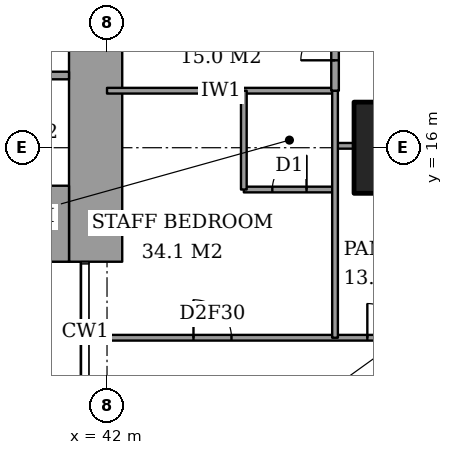
"""IFC4 building model, lengths in metres.
Left out: names, types, materials, properties, quantities, classifications, styles, units other than length and angle.
Written with IfcOpenShell. Run it as: python <this file> out.ifc"""

import sys

from ifc_helpers import new_model, si_unit, direction, frame, frame_2d, origin, origin_2d, place, context, subcontext, project, spatial, rectangle, extrude, element, fill, save


model = new_model("IFC4")
c1 = context("Model", 3, precision=1e-05, world=origin(), true_north=direction((0.0, 1.0)))
c2 = subcontext(c1, "Body", "Model", "MODEL_VIEW")
j1 = project(units=[si_unit("LENGTHUNIT", "METRE"), si_unit("PLANEANGLEUNIT", "RADIAN")], contexts=[c1])
p1 = place(None, origin())
s1 = spatial("IfcSite", under=j1, at=p1, CompositionType="ELEMENT")
p2 = place(p1, origin())
s2 = spatial("IfcBuilding", under=s1, at=p2, CompositionType="ELEMENT")
p3 = place(p2, frame((0.0, 0.0, 168.2)))
s3 = spatial("IfcBuildingStorey", under=s2, at=p3, CompositionType="ELEMENT", Elevation=168.2)
p4 = place(p3, frame((50.0, 16.0, 0.0), z_axis=(0.0, 0.0, 1.0), x_axis=(1.0, 0.0, 0.0)))
e1 = element("IfcColumn", 1, at=p4, inside=s3, PredefinedType="COLUMN", context=c2, shape_type="SweptSolid", body=[
    extrude(rectangle(XDim=3.0, YDim=2.4, at=origin_2d()), origin(), (0.0, 0.0, 1.0), 3.6),
])
p5 = place(p3, frame((37.85, 14.0, 0.0), z_axis=(0.0, 0.0, 1.0), x_axis=(1.0, 0.0, 0.0)))
e2 = element("IfcWall", 2, at=p5, inside=s3, PredefinedType="SHEAR", context=c2, shape_type="SweptSolid", body=[
    extrude(rectangle(XDim=3.15, YDim=2.0, at=frame_2d((1.575, 0.0))), origin(), (0.0, 0.0, 1.0), 3.6),
])
p6 = place(p3, frame((41.7, 13.0, 0.0), z_axis=(0.0, 0.0, 1.0), x_axis=(0.0, 1.0, 0.0)))
e3 = element("IfcWall", 3, at=p6, inside=s3, PredefinedType="SHEAR", context=c2, shape_type="SweptSolid", body=[
    extrude(rectangle(XDim=11.85, YDim=1.4, at=frame_2d((5.925, 0.0))), origin(), (0.0, 0.0, 1.0), 3.6),
])
p7 = place(p6, frame((7.5, 0.0, 0.0)))
e4 = element("IfcOpeningElement", 4, at=p7, cuts=e3, PredefinedType="OPENING", context=c2, shape_type="SweptSolid", body=[
    extrude(rectangle(XDim=1.8, YDim=2.4, at=frame_2d((0.9, 1.2))), frame((0.0, 0.71, 0.0), z_axis=(0.0, -1.0, 0.0), x_axis=(1.0, 0.0, 0.0)), (0.0, 0.0, 1.0), 1.42),
])
p8 = place(p3, frame((41.439, 11.0, 0.0), z_axis=(0.0, 0.0, 1.0), x_axis=(1.0, 0.0, 0.0)))
e5 = element("IfcWall", 5, at=p8, inside=s3, PredefinedType="PARTITIONING", context=c2, shape_type="SweptSolid", body=[
    extrude(rectangle(XDim=25.011, YDim=0.15, at=frame_2d((12.505, 0.0))), origin(), (0.0, 0.0, 1.0), 3.25),
])
p9 = place(p8, frame((12.361, 0.0, 0.0)))
e6 = element("IfcOpeningElement", 6, at=p9, cuts=e5, PredefinedType="OPENING", context=c2, shape_type="SweptSolid", body=[
    extrude(rectangle(XDim=1.0, YDim=2.1, at=frame_2d((0.5, 1.05))), frame((0.0, 0.085, 0.0), z_axis=(0.0, -1.0, 0.0), x_axis=(1.0, 0.0, 0.0)), (0.0, 0.0, 1.0), 0.17),
])
p10 = place(p8, frame((20.924, 0.0, 0.0)))
e7 = element("IfcOpeningElement", 7, at=p10, cuts=e5, PredefinedType="OPENING", context=c2, shape_type="SweptSolid", body=[
    extrude(rectangle(XDim=1.0, YDim=2.1, at=frame_2d((0.5, 1.05))), frame((0.0, 0.085, 0.0), z_axis=(0.0, -1.0, 0.0), x_axis=(1.0, 0.0, 0.0)), (0.0, 0.0, 1.0), 0.17),
])
p11 = place(p8, frame((15.448, 0.0, 0.0)))
e8 = element("IfcOpeningElement", 8, at=p11, cuts=e5, PredefinedType="OPENING", context=c2, shape_type="SweptSolid", body=[
    extrude(rectangle(XDim=0.9, YDim=2.1, at=frame_2d((0.45, 1.05))), frame((0.0, 0.085, 0.0), z_axis=(0.0, -1.0, 0.0), x_axis=(1.0, 0.0, 0.0)), (0.0, 0.0, 1.0), 0.17),
])
p12 = place(p8, frame((9.961, 0.0, 0.0)))
e9 = element("IfcOpeningElement", 9, at=p12, cuts=e5, PredefinedType="OPENING", context=c2, shape_type="SweptSolid", body=[
    extrude(rectangle(XDim=1.0, YDim=2.1, at=frame_2d((0.5, 1.05))), frame((0.0, 0.085, 0.0), z_axis=(0.0, -1.0, 0.0), x_axis=(1.0, 0.0, 0.0)), (0.0, 0.0, 1.0), 0.17),
])
p13 = place(p8, frame((7.411, 0.0, 0.0)))
e10 = element("IfcOpeningElement", 10, at=p13, cuts=e5, PredefinedType="OPENING", context=c2, shape_type="SweptSolid", body=[
    extrude(rectangle(XDim=0.9, YDim=2.1, at=frame_2d((0.45, 1.05))), frame((0.0, 0.085, 0.0), z_axis=(0.0, -1.0, 0.0), x_axis=(1.0, 0.0, 0.0)), (0.0, 0.0, 1.0), 0.17),
])
p14 = place(p8, frame((2.836, 0.0, 0.0)))
e11 = element("IfcOpeningElement", 11, at=p14, cuts=e5, PredefinedType="OPENING", context=c2, shape_type="SweptSolid", body=[
    extrude(rectangle(XDim=1.0, YDim=2.1, at=frame_2d((0.5, 1.05))), frame((0.0, 0.085, 0.0), z_axis=(0.0, -1.0, 0.0), x_axis=(1.0, 0.0, 0.0)), (0.0, 0.0, 1.0), 0.17),
])
p15 = place(p3, frame((45.6, 14.9, 0.0), z_axis=(0.0, 0.0, 1.0), x_axis=(1.0, 0.0, 0.0)))
e12 = element("IfcWall", 12, at=p15, inside=s3, PredefinedType="PARTITIONING", context=c2, shape_type="SweptSolid", body=[
    extrude(rectangle(XDim=2.4, YDim=0.15, at=frame_2d((1.2, 0.0))), origin(), (0.0, 0.0, 1.0), 3.25),
])
p16 = place(p15, frame((0.75, 0.0, 0.0)))
e13 = element("IfcOpeningElement", 13, at=p16, cuts=e12, PredefinedType="OPENING", context=c2, shape_type="SweptSolid", body=[
    extrude(rectangle(XDim=0.9, YDim=2.1, at=frame_2d((0.45, 1.05))), frame((0.0, 0.085, 0.0), z_axis=(0.0, -1.0, 0.0), x_axis=(1.0, 0.0, 0.0)), (0.0, 0.0, 1.0), 0.17),
])
p17 = place(p3, frame((48.0, 16.05, 0.0), z_axis=(0.0, 0.0, 1.0), x_axis=(1.0, 0.0, 0.0)))
e14 = element("IfcWall", 14, at=p17, inside=s3, PredefinedType="PARTITIONING", context=c2, shape_type="SweptSolid", body=[
    extrude(rectangle(XDim=0.5, YDim=0.15, at=frame_2d((0.25, 0.0))), origin(), (0.0, 0.0, 1.0), 3.25),
])
p18 = place(p3, frame((42.0, 17.5, 0.0), z_axis=(0.0, 0.0, 1.0), x_axis=(1.0, 0.0, 0.0)))
e15 = element("IfcWall", 15, at=p18, inside=s3, PredefinedType="PARTITIONING", context=c2, shape_type="SweptSolid", body=[
    extrude(rectangle(XDim=6.0, YDim=0.15, at=frame_2d((3.0, 0.0))), origin(), (0.0, 0.0, 1.0), 3.25),
])
p19 = place(p3, frame((45.6, 14.9, 0.0), z_axis=(0.0, 0.0, 1.0), x_axis=(0.0, 1.0, 0.0)))
e16 = element("IfcWall", 16, at=p19, inside=s3, PredefinedType="PARTITIONING", context=c2, shape_type="SweptSolid", body=[
    extrude(rectangle(XDim=2.6, YDim=0.15, at=frame_2d((1.3, 0.0))), origin(), (0.0, 0.0, 1.0), 3.25),
])
p20 = place(p3, frame((48.0, 17.5, 0.0), z_axis=(0.0, 0.0, 1.0), x_axis=(0.0, 1.0, 0.0)))
e17 = element("IfcWall", 17, at=p20, inside=s3, PredefinedType="PARTITIONING", context=c2, shape_type="SweptSolid", body=[
    extrude(rectangle(XDim=6.5, YDim=0.2, at=frame_2d((3.25, 0.0))), origin(), (0.0, 0.0, 1.0), 3.25),
])
p21 = place(p20, frame((3.9, 0.0, 0.0)))
e18 = element("IfcOpeningElement", 18, at=p21, cuts=e17, PredefinedType="OPENING", context=c2, shape_type="SweptSolid", body=[
    extrude(rectangle(XDim=1.2, YDim=2.4, at=frame_2d((0.6, 1.2))), frame((0.0, 0.11, 0.0), z_axis=(0.0, -1.0, 0.0), x_axis=(1.0, 0.0, 0.0)), (0.0, 0.0, 1.0), 0.22),
])
p22 = place(p20, frame((0.8, 0.0, 0.0)))
e19 = element("IfcOpeningElement", 19, at=p22, cuts=e17, PredefinedType="OPENING", context=c2, shape_type="SweptSolid", body=[
    extrude(rectangle(XDim=0.9, YDim=2.1, at=frame_2d((0.45, 1.05))), frame((0.0, 0.11, 0.0), z_axis=(0.0, -1.0, 0.0), x_axis=(1.0, 0.0, 0.0)), (0.0, 0.0, 1.0), 0.22),
])
p23 = place(p3, frame((48.0, 11.0, 0.0), z_axis=(0.0, 0.0, 1.0), x_axis=(0.0, 1.0, 0.0)))
e20 = element("IfcWall", 20, at=p23, inside=s3, PredefinedType="PARTITIONING", context=c2, shape_type="SweptSolid", body=[
    extrude(rectangle(XDim=6.5, YDim=0.15, at=frame_2d((3.25, 0.0))), origin(), (0.0, 0.0, 1.0), 3.25),
])
p24 = place(p3, frame((28.3, 17.9, 0.0), z_axis=(0.0, 0.0, 1.0), x_axis=(1.0, 0.0, 0.0)))
e21 = element("IfcWall", 21, at=p24, inside=s3, PredefinedType="PARTITIONING", context=c2, shape_type="SweptSolid", body=[
    extrude(rectangle(XDim=12.7, YDim=0.2, at=frame_2d((6.35, 0.0))), origin(), (0.0, 0.0, 1.0), 3.6),
])
p25 = place(p24, frame((0.95, 0.0, 0.0)))
e22 = element("IfcOpeningElement", 22, at=p25, cuts=e21, PredefinedType="OPENING", context=c2, shape_type="SweptSolid", body=[
    extrude(rectangle(XDim=1.1, YDim=2.1, at=frame_2d((0.55, 1.05))), frame((0.0, 0.11, 0.0), z_axis=(0.0, -1.0, 0.0), x_axis=(1.0, 0.0, 0.0)), (0.0, 0.0, 1.0), 0.22),
])
p26 = place(p24, frame((4.15, 0.0, 0.0)))
e23 = element("IfcOpeningElement", 23, at=p26, cuts=e21, PredefinedType="OPENING", context=c2, shape_type="SweptSolid", body=[
    extrude(rectangle(XDim=1.1, YDim=2.1, at=frame_2d((0.55, 1.05))), frame((0.0, 0.11, 0.0), z_axis=(0.0, -1.0, 0.0), x_axis=(1.0, 0.0, 0.0)), (0.0, 0.0, 1.0), 0.22),
])
p27 = place(p24, frame((7.35, 0.0, 0.0)))
e24 = element("IfcOpeningElement", 24, at=p27, cuts=e21, PredefinedType="OPENING", context=c2, shape_type="SweptSolid", body=[
    extrude(rectangle(XDim=1.1, YDim=2.1, at=frame_2d((0.55, 1.05))), frame((0.0, 0.11, 0.0), z_axis=(0.0, -1.0, 0.0), x_axis=(1.0, 0.0, 0.0)), (0.0, 0.0, 1.0), 0.22),
])
p28 = place(p24, frame((10.6, 0.0, 0.0)))
e25 = element("IfcOpeningElement", 25, at=p28, cuts=e21, PredefinedType="OPENING", context=c2, shape_type="SweptSolid", body=[
    extrude(rectangle(XDim=1.2, YDim=2.1, at=frame_2d((0.6, 1.05))), frame((0.0, 0.11, 0.0), z_axis=(0.0, -1.0, 0.0), x_axis=(1.0, 0.0, 0.0)), (0.0, 0.0, 1.0), 0.22),
])
p29 = place(p13, origin())
e26 = element("IfcDoor", 26, at=p29, inside=s3, OperationType="SINGLE_SWING_RIGHT", PredefinedType="DOOR", context=c2, shape_type="SweptSolid", body=[
    extrude(rectangle(XDim=0.9, YDim=2.1, at=frame_2d((0.45, 1.05))), frame((0.0, 0.025, 0.0), z_axis=(0.0, -1.0, 0.0), x_axis=(1.0, 0.0, 0.0)), (0.0, 0.0, 1.0), 0.05),
])
fill(e10, e26)
p30 = place(p16, origin())
e27 = element("IfcDoor", 27, at=p30, inside=s3, OperationType="SINGLE_SWING_LEFT", PredefinedType="DOOR", context=c2, shape_type="SweptSolid", body=[
    extrude(rectangle(XDim=0.9, YDim=2.1, at=frame_2d((0.45, 1.05))), frame((0.0, 0.025, 0.0), z_axis=(0.0, -1.0, 0.0), x_axis=(1.0, 0.0, 0.0)), (0.0, 0.0, 1.0), 0.05),
])
fill(e13, e27)
p31 = place(p14, origin())
e28 = element("IfcDoor", 28, at=p31, inside=s3, OperationType="SINGLE_SWING_RIGHT", PredefinedType="DOOR", context=c2, shape_type="SweptSolid", body=[
    extrude(rectangle(XDim=1.0, YDim=2.1, at=frame_2d((0.5, 1.05))), frame((0.0, 0.025, 0.0), z_axis=(0.0, -1.0, 0.0), x_axis=(1.0, 0.0, 0.0)), (0.0, 0.0, 1.0), 0.05),
])
fill(e11, e28)
p32 = place(p22, origin())
e29 = element("IfcDoor", 29, at=p32, inside=s3, OperationType="SINGLE_SWING_RIGHT", PredefinedType="DOOR", context=c2, shape_type="SweptSolid", body=[
    extrude(rectangle(XDim=0.9, YDim=2.1, at=frame_2d((0.45, 1.05))), frame((0.0, 0.025, 0.0), z_axis=(0.0, -1.0, 0.0), x_axis=(1.0, 0.0, 0.0)), (0.0, 0.0, 1.0), 0.05),
])
fill(e19, e29)
save(model, sys.argv[1])
